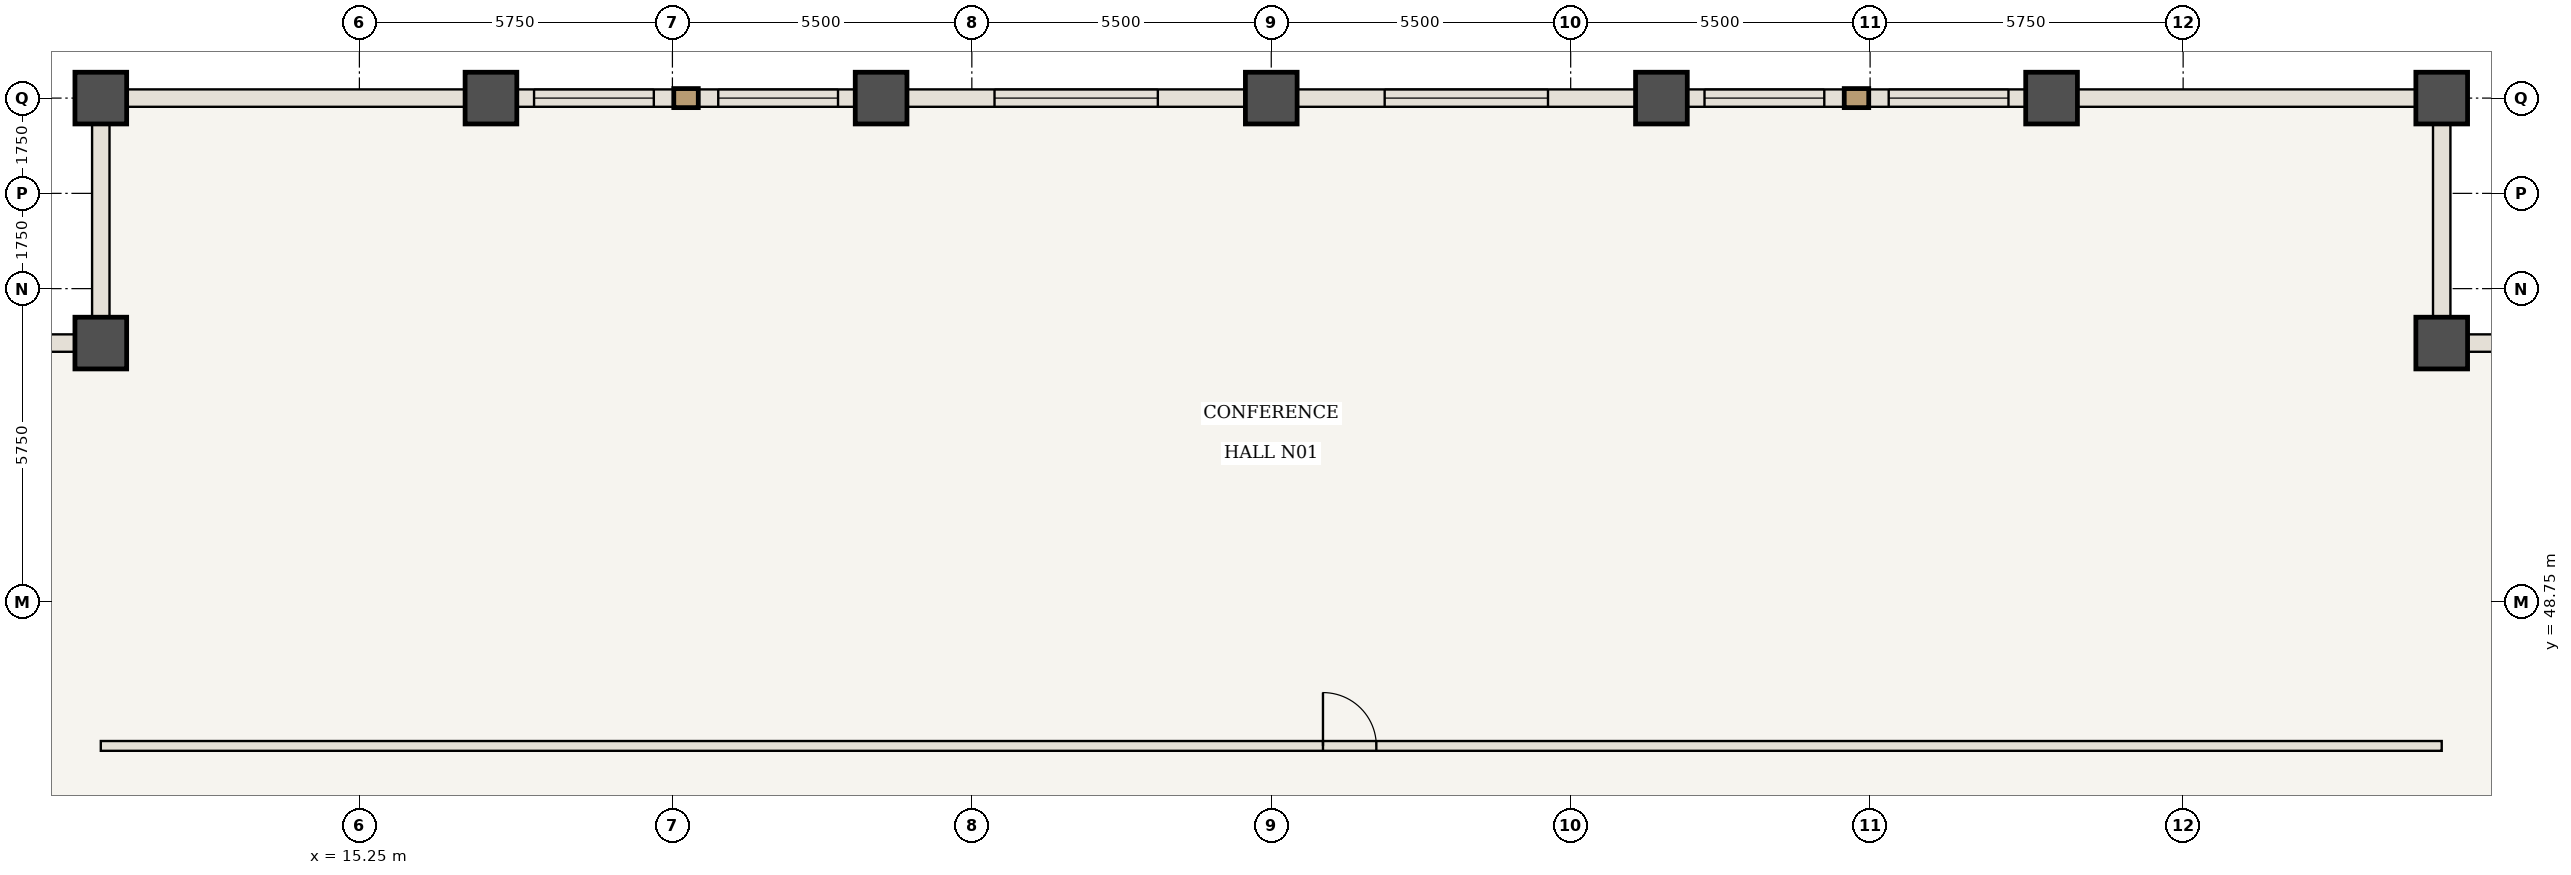
"""IFC4 building model, lengths in metres.
Left out: names, types, materials, properties, quantities, classifications, styles, units other than length and angle.
Written with IfcOpenShell. Run it as: python <this file> out.ifc"""

import sys

from ifc_helpers import new_model, si_unit, direction, frame, frame_2d, origin, origin_2d, place, context, subcontext, project, spatial, rectangle, extrude, element, fill, save


model = new_model("IFC4")
c1 = context("Model", 3, precision=1e-05, world=origin(), true_north=direction((0.0, 1.0)))
c2 = subcontext(c1, "Body", "Model", "MODEL_VIEW")
j1 = project(units=[si_unit("LENGTHUNIT", "METRE"), si_unit("PLANEANGLEUNIT", "RADIAN")], contexts=[c1])
p1 = place(None, origin())
s1 = spatial("IfcSite", under=j1, at=p1, CompositionType="ELEMENT")
p2 = place(p1, origin())
s2 = spatial("IfcBuilding", under=s1, at=p2, CompositionType="ELEMENT")
p3 = place(p2, frame((0.0, 0.0, 145.25)))
s3 = spatial("IfcBuildingStorey", under=s2, at=p3, CompositionType="ELEMENT", Elevation=145.25)
for number, where, z_axis, x_axis in (
    (1, (53.5, 53.5, 0.0), (0.0, 0.0, 1.0), (1.0, 0.0, 0.0)),
    (2, (53.5, 58.0, 0.0), (0.0, 0.0, 1.0), (1.0, 0.0, 0.0)),
    (3, (10.5, 58.0, 0.0), (0.0, 0.0, 1.0), (1.0, 0.0, 0.0)),
    (4, (10.5, 53.5, 0.0), (0.0, 0.0, 1.0), (1.0, 0.0, 0.0)),
    (5, (17.667, 58.0, 0.0), (0.0, 0.0, 1.0), (1.0, 0.0, 0.0)),
    (6, (24.833, 58.0, 0.0), (0.0, 0.0, 1.0), (1.0, 0.0, 0.0)),
    (7, (32.0, 58.0, 0.0), (0.0, 0.0, 1.0), (1.0, 0.0, 0.0)),
    (8, (39.167, 58.0, 0.0), (0.0, 0.0, 1.0), (1.0, 0.0, 0.0)),
    (9, (46.333, 58.0, 0.0), (0.0, 0.0, 1.0), (1.0, 0.0, 0.0)),
):
    element("IfcColumn", number, at=place(p3, frame(where, z_axis=z_axis, x_axis=x_axis)), inside=s3, PredefinedType="COLUMN", context=c2, shape_type="SweptSolid", body=[
        extrude(rectangle(XDim=0.95, YDim=0.95, at=origin_2d()), origin(), (0.0, 0.0, 1.0), 3.85),
    ])
p4 = place(p3, frame((10.5, 46.1, 0.0), z_axis=(0.0, 0.0, 1.0), x_axis=(1.0, 0.0, 0.0)))
e10 = element("IfcWall", 10, at=p4, inside=s3, PredefinedType="STANDARD", context=c2, shape_type="SweptSolid", body=[
    extrude(rectangle(XDim=43.0, YDim=0.18, at=frame_2d((21.5, 0.0))), origin(), (0.0, 0.0, 1.0), 3.685),
])
p5 = place(p4, frame((22.45, 0.0, 0.0)))
e11 = element("IfcOpeningElement", 11, at=p5, cuts=e10, PredefinedType="OPENING", context=c2, shape_type="SweptSolid", body=[
    extrude(rectangle(XDim=0.98, YDim=2.2, at=frame_2d((0.49, 1.1))), frame((0.0, 0.1, 0.0), z_axis=(0.0, -1.0, 0.0), x_axis=(1.0, 0.0, 0.0)), (0.0, 0.0, 1.0), 0.2),
])
p6 = place(p3, frame((10.5, 58.0, 0.0), z_axis=(0.0, 0.0, 1.0), x_axis=(1.0, 0.0, 0.0)))
e12 = element("IfcWall", 12, at=p6, inside=s3, PredefinedType="USERDEFINED", context=c2, shape_type="SweptSolid", body=[
    extrude(rectangle(XDim=7.167, YDim=0.32, at=frame_2d((3.583, 0.0))), origin(), (0.0, 0.0, 1.0), 2.885),
])
p7 = place(p3, frame((17.667, 58.0, 0.0), z_axis=(0.0, 0.0, 1.0), x_axis=(1.0, 0.0, 0.0)))
e13 = element("IfcWall", 13, at=p7, inside=s3, PredefinedType="USERDEFINED", context=c2, shape_type="SweptSolid", body=[
    extrude(rectangle(XDim=7.167, YDim=0.32, at=frame_2d((3.583, 0.0))), origin(), (0.0, 0.0, 1.0), 2.885),
])
p8 = place(p7, frame((0.792, 0.0, 0.85)))
e14 = element("IfcOpeningElement", 14, at=p8, cuts=e13, PredefinedType="OPENING", context=c2, shape_type="SweptSolid", body=[
    extrude(rectangle(XDim=2.2, YDim=1.835, at=frame_2d((1.1, 0.917))), frame((0.0, 0.17, 0.0), z_axis=(0.0, -1.0, 0.0), x_axis=(1.0, 0.0, 0.0)), (0.0, 0.0, 1.0), 0.34),
])
p9 = place(p7, frame((4.175, 0.0, 0.85)))
e15 = element("IfcOpeningElement", 15, at=p9, cuts=e13, PredefinedType="OPENING", context=c2, shape_type="SweptSolid", body=[
    extrude(rectangle(XDim=2.2, YDim=1.835, at=frame_2d((1.1, 0.917))), frame((0.0, 0.17, 0.0), z_axis=(0.0, -1.0, 0.0), x_axis=(1.0, 0.0, 0.0)), (0.0, 0.0, 1.0), 0.34),
])
p10 = place(p3, frame((24.833, 58.0, 0.0), z_axis=(0.0, 0.0, 1.0), x_axis=(1.0, 0.0, 0.0)))
e16 = element("IfcWall", 16, at=p10, inside=s3, PredefinedType="USERDEFINED", context=c2, shape_type="SweptSolid", body=[
    extrude(rectangle(XDim=7.167, YDim=0.32, at=frame_2d((3.583, 0.0))), origin(), (0.0, 0.0, 1.0), 2.885),
])
p11 = place(p10, frame((2.083, 0.0, 0.85)))
e17 = element("IfcOpeningElement", 17, at=p11, cuts=e16, PredefinedType="OPENING", context=c2, shape_type="SweptSolid", body=[
    extrude(rectangle(XDim=3.0, YDim=1.835, at=frame_2d((1.5, 0.917))), frame((0.0, 0.17, 0.0), z_axis=(0.0, -1.0, 0.0), x_axis=(1.0, 0.0, 0.0)), (0.0, 0.0, 1.0), 0.34),
])
p12 = place(p3, frame((32.0, 58.0, 0.0), z_axis=(0.0, 0.0, 1.0), x_axis=(1.0, 0.0, 0.0)))
e18 = element("IfcWall", 18, at=p12, inside=s3, PredefinedType="USERDEFINED", context=c2, shape_type="SweptSolid", body=[
    extrude(rectangle(XDim=7.167, YDim=0.32, at=frame_2d((3.583, 0.0))), origin(), (0.0, 0.0, 1.0), 2.885),
])
p13 = place(p12, frame((2.083, 0.0, 0.85)))
e19 = element("IfcOpeningElement", 19, at=p13, cuts=e18, PredefinedType="OPENING", context=c2, shape_type="SweptSolid", body=[
    extrude(rectangle(XDim=3.0, YDim=1.835, at=frame_2d((1.5, 0.917))), frame((0.0, 0.17, 0.0), z_axis=(0.0, -1.0, 0.0), x_axis=(1.0, 0.0, 0.0)), (0.0, 0.0, 1.0), 0.34),
])
p14 = place(p3, frame((39.167, 58.0, 0.0), z_axis=(0.0, 0.0, 1.0), x_axis=(1.0, 0.0, 0.0)))
e20 = element("IfcWall", 20, at=p14, inside=s3, PredefinedType="USERDEFINED", context=c2, shape_type="SweptSolid", body=[
    extrude(rectangle(XDim=7.167, YDim=0.32, at=frame_2d((3.583, 0.0))), origin(), (0.0, 0.0, 1.0), 2.885),
])
p15 = place(p14, frame((0.792, 0.0, 0.85)))
e21 = element("IfcOpeningElement", 21, at=p15, cuts=e20, PredefinedType="OPENING", context=c2, shape_type="SweptSolid", body=[
    extrude(rectangle(XDim=2.2, YDim=1.835, at=frame_2d((1.1, 0.917))), frame((0.0, 0.17, 0.0), z_axis=(0.0, -1.0, 0.0), x_axis=(1.0, 0.0, 0.0)), (0.0, 0.0, 1.0), 0.34),
])
p16 = place(p14, frame((4.175, 0.0, 0.85)))
e22 = element("IfcOpeningElement", 22, at=p16, cuts=e20, PredefinedType="OPENING", context=c2, shape_type="SweptSolid", body=[
    extrude(rectangle(XDim=2.2, YDim=1.835, at=frame_2d((1.1, 0.917))), frame((0.0, 0.17, 0.0), z_axis=(0.0, -1.0, 0.0), x_axis=(1.0, 0.0, 0.0)), (0.0, 0.0, 1.0), 0.34),
])
p17 = place(p3, frame((46.333, 58.0, 0.0), z_axis=(0.0, 0.0, 1.0), x_axis=(1.0, 0.0, 0.0)))
e23 = element("IfcWall", 23, at=p17, inside=s3, PredefinedType="USERDEFINED", context=c2, shape_type="SweptSolid", body=[
    extrude(rectangle(XDim=7.167, YDim=0.32, at=frame_2d((3.583, 0.0))), origin(), (0.0, 0.0, 1.0), 2.885),
])
for number, where, z_axis, x_axis in (
    (24, (53.5, 53.5, 0.0), (0.0, 0.0, 1.0), (1.0, 0.0, 0.0)),
    (25, (53.5, 58.0, 0.0), (0.0, 0.0, 1.0), (0.0, -1.0, 0.0)),
    (26, (10.5, 53.5, 0.0), (0.0, 0.0, 1.0), (0.0, 1.0, 0.0)),
    (27, (6.0, 53.5, 0.0), (0.0, 0.0, 1.0), (1.0, 0.0, 0.0)),
):
    element("IfcWall", number, at=place(p3, frame(where, z_axis=z_axis, x_axis=x_axis)), inside=s3, PredefinedType="USERDEFINED", context=c2, shape_type="SweptSolid", body=[
        extrude(rectangle(XDim=4.5, YDim=0.32, at=frame_2d((2.25, 0.0))), origin(), (0.0, 0.0, 1.0), 2.885),
    ])
p18 = place(p5, origin())
e28 = element("IfcDoor", 28, at=p18, inside=s3, OperationType="SINGLE_SWING_LEFT", PredefinedType="DOOR", context=c2, shape_type="SweptSolid", body=[
    extrude(rectangle(XDim=0.98, YDim=2.2, at=frame_2d((0.49, 1.1))), frame((0.0, 0.025, 0.0), z_axis=(0.0, -1.0, 0.0), x_axis=(1.0, 0.0, 0.0)), (0.0, 0.0, 1.0), 0.05),
])
fill(e11, e28)
p19 = place(p8, origin())
e29 = element("IfcWindow", 29, at=p19, inside=s3, PartitioningType="SINGLE_PANEL", PredefinedType="WINDOW", context=c2, shape_type="SweptSolid", body=[
    extrude(rectangle(XDim=2.2, YDim=1.835, at=frame_2d((1.1, 0.917))), frame((0.0, 0.03, 0.0), z_axis=(0.0, -1.0, 0.0), x_axis=(1.0, 0.0, 0.0)), (0.0, 0.0, 1.0), 0.06),
])
fill(e14, e29)
p20 = place(p9, origin())
e30 = element("IfcWindow", 30, at=p20, inside=s3, PartitioningType="SINGLE_PANEL", PredefinedType="WINDOW", context=c2, shape_type="SweptSolid", body=[
    extrude(rectangle(XDim=2.2, YDim=1.835, at=frame_2d((1.1, 0.917))), frame((0.0, 0.03, 0.0), z_axis=(0.0, -1.0, 0.0), x_axis=(1.0, 0.0, 0.0)), (0.0, 0.0, 1.0), 0.06),
])
fill(e15, e30)
p21 = place(p11, origin())
e31 = element("IfcWindow", 31, at=p21, inside=s3, PartitioningType="SINGLE_PANEL", PredefinedType="WINDOW", context=c2, shape_type="SweptSolid", body=[
    extrude(rectangle(XDim=3.0, YDim=1.835, at=frame_2d((1.5, 0.917))), frame((0.0, 0.03, 0.0), z_axis=(0.0, -1.0, 0.0), x_axis=(1.0, 0.0, 0.0)), (0.0, 0.0, 1.0), 0.06),
])
fill(e17, e31)
p22 = place(p13, origin())
e32 = element("IfcWindow", 32, at=p22, inside=s3, PartitioningType="SINGLE_PANEL", PredefinedType="WINDOW", context=c2, shape_type="SweptSolid", body=[
    extrude(rectangle(XDim=3.0, YDim=1.835, at=frame_2d((1.5, 0.917))), frame((0.0, 0.03, 0.0), z_axis=(0.0, -1.0, 0.0), x_axis=(1.0, 0.0, 0.0)), (0.0, 0.0, 1.0), 0.06),
])
fill(e19, e32)
p23 = place(p15, origin())
e33 = element("IfcWindow", 33, at=p23, inside=s3, PartitioningType="SINGLE_PANEL", PredefinedType="WINDOW", context=c2, shape_type="SweptSolid", body=[
    extrude(rectangle(XDim=2.2, YDim=1.835, at=frame_2d((1.1, 0.917))), frame((0.0, 0.03, 0.0), z_axis=(0.0, -1.0, 0.0), x_axis=(1.0, 0.0, 0.0)), (0.0, 0.0, 1.0), 0.06),
])
fill(e21, e33)
p24 = place(p16, origin())
e34 = element("IfcWindow", 34, at=p24, inside=s3, PartitioningType="SINGLE_PANEL", PredefinedType="WINDOW", context=c2, shape_type="SweptSolid", body=[
    extrude(rectangle(XDim=2.2, YDim=1.835, at=frame_2d((1.1, 0.917))), frame((0.0, 0.03, 0.0), z_axis=(0.0, -1.0, 0.0), x_axis=(1.0, 0.0, 0.0)), (0.0, 0.0, 1.0), 0.06),
])
fill(e22, e34)
save(model, sys.argv[1])
